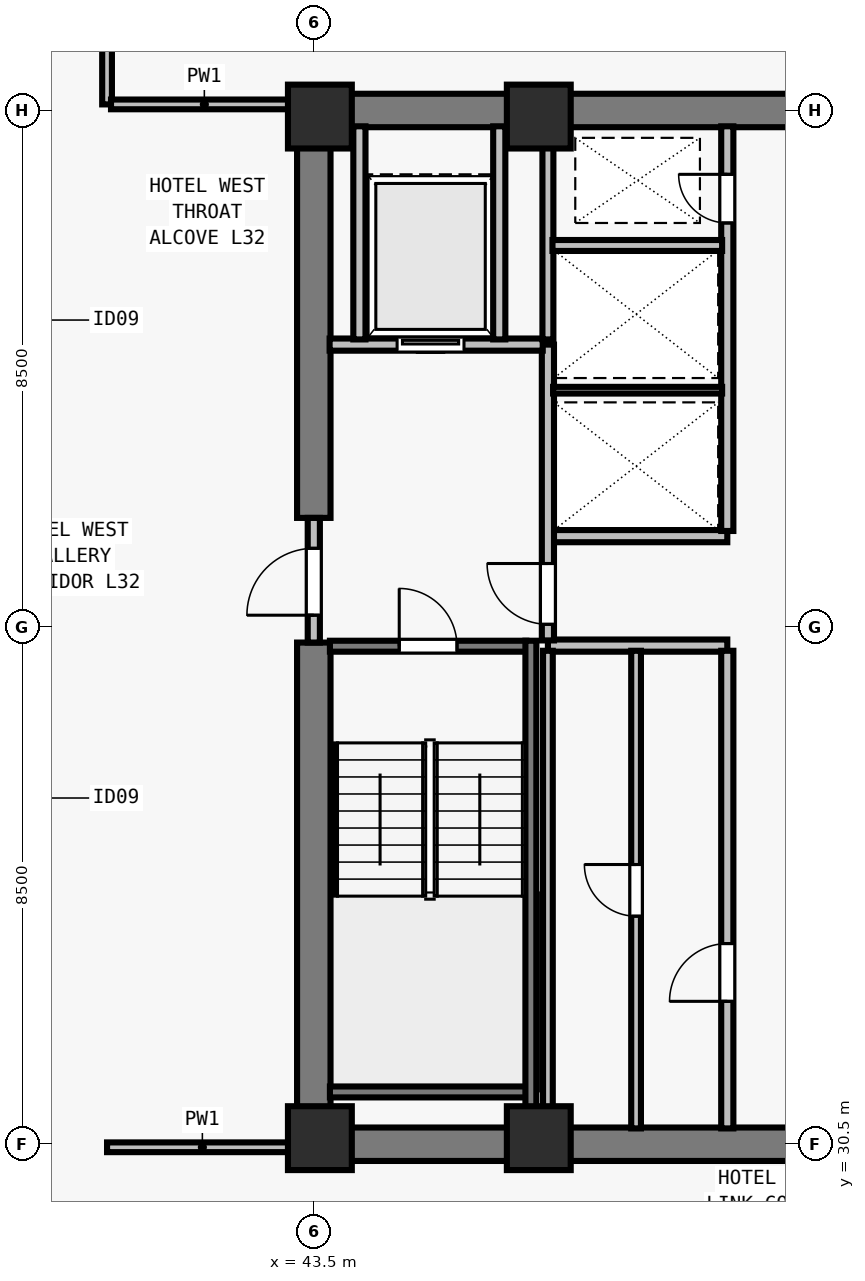
"""IFC4 building model, lengths in metres.
Left out: names, types, materials, properties, quantities, classifications, styles, units other than length and angle.
Written with IfcOpenShell. Run it as: python <this file> out.ifc"""

import sys

from ifc_helpers import new_model, si_unit, direction, frame, frame_2d, origin, origin_2d, place, context, subcontext, project, spatial, rectangle, extrude, element, fill, save


model = new_model("IFC4")
c1 = context("Model", 3, precision=1e-05, world=origin(), true_north=direction((0.0, 1.0)))
c2 = subcontext(c1, "Body", "Model", "MODEL_VIEW")
j1 = project(units=[si_unit("LENGTHUNIT", "METRE"), si_unit("PLANEANGLEUNIT", "RADIAN")], contexts=[c1])
p1 = place(None, origin())
s1 = spatial("IfcSite", under=j1, at=p1, CompositionType="ELEMENT")
p2 = place(p1, origin())
s2 = spatial("IfcBuilding", under=s1, at=p2, CompositionType="ELEMENT")
p3 = place(p2, frame((0.0, 0.0, 120.0)))
s3 = spatial("IfcBuildingStorey", under=s2, at=p3, CompositionType="ELEMENT", Elevation=120.0)
for number, where, z_axis, x_axis in (
    (1, (43.6, 30.6, 0.0), (0.0, 0.0, 1.0), (1.0, 0.0, 0.0)),
    (2, (47.2, 30.6, 0.0), (0.0, 0.0, 1.0), (1.0, 0.0, 0.0)),
    (3, (43.6, 47.4, 0.0), (0.0, 0.0, 1.0), (1.0, 0.0, 0.0)),
    (4, (47.2, 47.4, 0.0), (0.0, 0.0, 1.0), (1.0, 0.0, 0.0)),
):
    element("IfcColumn", number, at=place(p3, frame(where, z_axis=z_axis, x_axis=x_axis)), inside=s3, PredefinedType="COLUMN", context=c2, shape_type="SweptSolid", body=[
        extrude(rectangle(XDim=1.05, YDim=1.05, at=origin_2d()), origin(), (0.0, 0.0, 1.0), 3.5),
    ])
for number, where, z_axis, x_axis in (
    (5, (43.225, 30.5, 0.0), (0.0, 0.0, 1.0), (1.0, 0.0, 0.0)),
    (6, (43.225, 47.5, 0.0), (0.0, 0.0, 1.0), (1.0, 0.0, 0.0)),
):
    element("IfcWall", number, at=place(p3, frame(where, z_axis=z_axis, x_axis=x_axis)), inside=s3, PredefinedType="SHEAR", context=c2, shape_type="SweptSolid", body=[
        extrude(rectangle(XDim=17.55, YDim=0.55, at=frame_2d((8.775, 0.0))), origin(), (0.0, 0.0, 1.0), 3.28),
    ])
p4 = place(p3, frame((43.5, 30.765, 0.0), z_axis=(0.0, 0.0, 1.0), x_axis=(0.0, 1.0, 0.0)))
e7 = element("IfcWall", 7, at=p4, inside=s3, PredefinedType="SHEAR", context=c2, shape_type="SweptSolid", body=[
    extrude(rectangle(XDim=7.985, YDim=0.55, at=frame_2d((3.993, 0.0))), origin(), (0.0, 0.0, 1.0), 3.28),
])
p5 = place(p3, frame((43.5, 40.8, 0.0), z_axis=(0.0, 0.0, 1.0), x_axis=(0.0, 1.0, 0.0)))
e8 = element("IfcWall", 8, at=p5, inside=s3, PredefinedType="SHEAR", context=c2, shape_type="SweptSolid", body=[
    extrude(rectangle(XDim=6.435, YDim=0.55, at=frame_2d((3.218, 0.0))), origin(), (0.0, 0.0, 1.0), 3.28),
])
for number, where, z_axis, x_axis in (
    (9, (47.35, 38.7, 0.0), (0.0, 0.0, 1.0), (1.0, 0.0, 0.0)),
    (10, (47.35, 40.5, 0.0), (0.0, 0.0, 1.0), (1.0, 0.0, 0.0)),
):
    element("IfcWall", number, at=place(p3, frame(where, z_axis=z_axis, x_axis=x_axis)), inside=s3, PredefinedType="SOLIDWALL", context=c2, shape_type="SweptSolid", body=[
        extrude(rectangle(XDim=2.95, YDim=0.2, at=frame_2d((1.475, 0.0))), origin(), (0.0, 0.0, 1.0), 3.28),
    ])
p6 = place(p3, frame((50.3, 30.76, 0.0), z_axis=(0.0, 0.0, 1.0), x_axis=(0.0, 1.0, 0.0)))
e11 = element("IfcWall", 11, at=p6, inside=s3, PredefinedType="SOLIDWALL", context=c2, shape_type="SweptSolid", body=[
    extrude(rectangle(XDim=7.855, YDim=0.2, at=frame_2d((3.927, 0.0))), origin(), (0.0, 0.0, 1.0), 3.28),
])
p7 = place(p6, frame((2.09, 0.0, 0.0)))
e12 = element("IfcOpeningElement", 12, at=p7, cuts=e11, PredefinedType="OPENING", context=c2, shape_type="SweptSolid", body=[
    extrude(rectangle(XDim=0.95, YDim=2.12, at=frame_2d((0.475, 1.06))), frame((0.0, 0.11, 0.0), z_axis=(0.0, -1.0, 0.0), x_axis=(1.0, 0.0, 0.0)), (0.0, 0.0, 1.0), 0.22),
])
p8 = place(p3, frame((50.3, 40.585, 0.0), z_axis=(0.0, 0.0, 1.0), x_axis=(0.0, 1.0, 0.0)))
e13 = element("IfcWall", 13, at=p8, inside=s3, PredefinedType="SOLIDWALL", context=c2, shape_type="SweptSolid", body=[
    extrude(rectangle(XDim=6.655, YDim=0.2, at=frame_2d((3.328, 0.0))), origin(), (0.0, 0.0, 1.0), 3.28),
])
p9 = place(p8, frame((5.065, 0.0, 0.0)))
e14 = element("IfcOpeningElement", 14, at=p9, cuts=e13, PredefinedType="OPENING", context=c2, shape_type="SweptSolid", body=[
    extrude(rectangle(XDim=0.8, YDim=2.08, at=frame_2d((0.4, 1.04))), frame((0.0, 0.11, 0.0), z_axis=(0.0, -1.0, 0.0), x_axis=(1.0, 0.0, 0.0)), (0.0, 0.0, 1.0), 0.22),
])
p10 = place(p3, frame((43.5, 38.75, 0.0), z_axis=(0.0, 0.0, 1.0), x_axis=(0.0, 1.0, 0.0)))
e15 = element("IfcWall", 15, at=p10, inside=s3, PredefinedType="SOLIDWALL", context=c2, shape_type="SweptSolid", body=[
    extrude(rectangle(XDim=2.05, YDim=0.2, at=frame_2d((1.025, 0.0))), origin(), (0.0, 0.0, 1.0), 3.28),
])
p11 = place(p10, frame((0.45, 0.0, 0.0)))
e16 = element("IfcOpeningElement", 16, at=p11, cuts=e15, PredefinedType="OPENING", context=c2, shape_type="SweptSolid", body=[
    extrude(rectangle(XDim=1.1, YDim=2.15, at=frame_2d((0.55, 1.075))), frame((0.0, 0.11, 0.0), z_axis=(0.0, -1.0, 0.0), x_axis=(1.0, 0.0, 0.0)), (0.0, 0.0, 1.0), 0.22),
])
p12 = place(p3, frame((47.35, 38.785, 0.0), z_axis=(0.0, 0.0, 1.0), x_axis=(0.0, 1.0, 0.0)))
e17 = element("IfcWall", 17, at=p12, inside=s3, PredefinedType="SOLIDWALL", context=c2, shape_type="SweptSolid", body=[
    extrude(rectangle(XDim=4.865, YDim=0.2, at=frame_2d((2.433, 0.0))), origin(), (0.0, 0.0, 1.0), 3.28),
])
p13 = place(p12, frame((0.265, 0.0, 0.0)))
e18 = element("IfcOpeningElement", 18, at=p13, cuts=e17, PredefinedType="OPENING", context=c2, shape_type="SweptSolid", body=[
    extrude(rectangle(XDim=1.0, YDim=2.15, at=frame_2d((0.5, 1.075))), frame((0.0, 0.11, 0.0), z_axis=(0.0, -1.0, 0.0), x_axis=(1.0, 0.0, 0.0)), (0.0, 0.0, 1.0), 0.22),
])
p14 = place(p3, frame((43.76, 43.65, 0.0), z_axis=(0.0, 0.0, 1.0), x_axis=(1.0, 0.0, 0.0)))
e19 = element("IfcWall", 19, at=p14, inside=s3, PredefinedType="SOLIDWALL", context=c2, shape_type="SweptSolid", body=[
    extrude(rectangle(XDim=3.505, YDim=0.2, at=frame_2d((1.752, 0.0))), origin(), (0.0, 0.0, 1.0), 3.28),
])
p15 = place(p14, frame((1.11, 0.0, 0.0)))
e20 = element("IfcOpeningElement", 20, at=p15, cuts=e19, PredefinedType="OPENING", context=c2, shape_type="SweptSolid", body=[
    extrude(rectangle(XDim=1.1, YDim=2.2, at=frame_2d((0.55, 1.1))), frame((0.0, 0.11, 0.0), z_axis=(0.0, -1.0, 0.0), x_axis=(1.0, 0.0, 0.0)), (0.0, 0.0, 1.0), 0.22),
])
for number, where, z_axis, x_axis in (
    (21, (46.55, 43.735, 0.0), (0.0, 0.0, 1.0), (0.0, 1.0, 0.0)),
    (22, (44.25, 43.735, 0.0), (0.0, 0.0, 1.0), (0.0, 1.0, 0.0)),
):
    element("IfcWall", number, at=place(p3, frame(where, z_axis=z_axis, x_axis=x_axis)), inside=s3, PredefinedType="SOLIDWALL", context=c2, shape_type="SweptSolid", body=[
        extrude(rectangle(XDim=3.505, YDim=0.2, at=frame_2d((1.752, 0.0))), origin(), (0.0, 0.0, 1.0), 3.28),
    ])
p16 = place(p3, frame((47.35, 30.76, 0.0), z_axis=(0.0, 0.0, 1.0), x_axis=(0.0, 1.0, 0.0)))
e23 = element("IfcWall", 23, at=p16, inside=s3, PredefinedType="PARTITIONING", context=c2, shape_type="SweptSolid", body=[
    extrude(rectangle(XDim=7.855, YDim=0.16, at=frame_2d((3.927, 0.0))), origin(), (0.0, 0.0, 1.0), 3.28),
])
p17 = place(p3, frame((48.8, 30.76, 0.0), z_axis=(0.0, 0.0, 1.0), x_axis=(0.0, 1.0, 0.0)))
e24 = element("IfcWall", 24, at=p17, inside=s3, PredefinedType="PARTITIONING", context=c2, shape_type="SweptSolid", body=[
    extrude(rectangle(XDim=7.855, YDim=0.16, at=frame_2d((3.927, 0.0))), origin(), (0.0, 0.0, 1.0), 3.28),
])
p18 = place(p17, frame((3.49, 0.0, 0.0)))
e25 = element("IfcOpeningElement", 25, at=p18, cuts=e24, PredefinedType="OPENING", context=c2, shape_type="SweptSolid", body=[
    extrude(rectangle(XDim=0.85, YDim=2.12, at=frame_2d((0.425, 1.06))), frame((0.0, 0.09, 0.0), z_axis=(0.0, -1.0, 0.0), x_axis=(1.0, 0.0, 0.0)), (0.0, 0.0, 1.0), 0.18),
])
p19 = place(p3, frame((47.35, 43.735, 0.0), z_axis=(0.0, 0.0, 1.0), x_axis=(0.0, 1.0, 0.0)))
e26 = element("IfcWall", 26, at=p19, inside=s3, PredefinedType="SOLIDWALL", context=c2, shape_type="SweptSolid", body=[
    extrude(rectangle(XDim=3.505, YDim=0.18, at=frame_2d((1.752, 0.0))), origin(), (0.0, 0.0, 1.0), 3.28),
])
p20 = place(p3, frame((47.435, 42.9, 0.0), z_axis=(0.0, 0.0, 1.0), x_axis=(1.0, 0.0, 0.0)))
e27 = element("IfcWall", 27, at=p20, inside=s3, PredefinedType="PARTITIONING", context=c2, shape_type="SweptSolid", body=[
    extrude(rectangle(XDim=2.78, YDim=0.11, at=frame_2d((1.39, 0.0))), origin(), (0.0, 0.0, 1.0), 3.28),
])
p21 = place(p3, frame((47.425, 45.28, 0.0), z_axis=(0.0, 0.0, 1.0), x_axis=(1.0, 0.0, 0.0)))
e28 = element("IfcWall", 28, at=p21, inside=s3, PredefinedType="SOLIDWALL", context=c2, shape_type="SweptSolid", body=[
    extrude(rectangle(XDim=2.79, YDim=0.18, at=frame_2d((1.395, 0.0))), origin(), (0.0, 0.0, 1.0), 3.28),
])
p22 = place(p3, frame((40.1, 47.6, 0.0), z_axis=(0.0, 0.0, 1.0), x_axis=(0.0, 1.0, 0.0)))
e29 = element("IfcWall", 29, at=p22, inside=s3, PredefinedType="PARTITIONING", context=c2, shape_type="SweptSolid", body=[
    extrude(rectangle(XDim=15.075, YDim=0.16, at=frame_2d((7.538, 0.0))), origin(), (0.0, 0.0, 1.0), 2.555),
])
p23 = place(p22, frame((1.8, 0.0, 0.0)))
e30 = element("IfcOpeningElement", 30, at=p23, cuts=e29, PredefinedType="OPENING", context=c2, shape_type="SweptSolid", body=[
    extrude(rectangle(XDim=0.96, YDim=2.12, at=frame_2d((0.48, 1.06))), frame((0.0, 0.09, 0.0), z_axis=(0.0, -1.0, 0.0), x_axis=(1.0, 0.0, 0.0)), (0.0, 0.0, 1.0), 0.18),
])
p24 = place(p3, frame((40.1, 30.45, 0.0), z_axis=(0.0, 0.0, 1.0), x_axis=(1.0, 0.0, 0.0)))
e31 = element("IfcWall", 31, at=p24, inside=s3, PredefinedType="PARTITIONING", context=c2, shape_type="SweptSolid", body=[
    extrude(rectangle(XDim=3.135, YDim=0.16, at=frame_2d((1.567, 0.0))), origin(), (0.0, 0.0, 1.0), 3.28),
])
p25 = place(p3, frame((40.165, 47.6, 0.0), z_axis=(0.0, 0.0, 1.0), x_axis=(1.0, 0.0, 0.0)))
e32 = element("IfcWall", 32, at=p25, inside=s3, PredefinedType="PARTITIONING", context=c2, shape_type="SweptSolid", body=[
    extrude(rectangle(XDim=3.07, YDim=0.16, at=frame_2d((1.535, 0.0))), origin(), (0.0, 0.0, 1.0), 3.28),
])
p26 = place(p3, frame((43.765, 38.69, 0.0), z_axis=(0.0, 0.0, 1.0), x_axis=(1.0, 0.0, 0.0)))
e33 = element("IfcWall", 33, at=p26, inside=s3, PredefinedType="SOLIDWALL", context=c2, shape_type="SweptSolid", body=[
    extrude(rectangle(XDim=3.23, YDim=0.18, at=frame_2d((1.615, 0.0))), origin(), (0.0, 0.0, 1.0), 3.28),
])
p27 = place(p26, frame((1.14, 0.0, 0.0)))
e34 = element("IfcOpeningElement", 34, at=p27, cuts=e33, PredefinedType="OPENING", context=c2, shape_type="SweptSolid", body=[
    extrude(rectangle(XDim=0.95, YDim=2.15, at=frame_2d((0.475, 1.075))), frame((0.0, 0.1, 0.0), z_axis=(0.0, -1.0, 0.0), x_axis=(1.0, 0.0, 0.0)), (0.0, 0.0, 1.0), 0.2),
])
p28 = place(p3, frame((43.765, 31.36, 0.0), z_axis=(0.0, 0.0, 1.0), x_axis=(1.0, 0.0, 0.0)))
e35 = element("IfcWall", 35, at=p28, inside=s3, PredefinedType="SOLIDWALL", context=c2, shape_type="SweptSolid", body=[
    extrude(rectangle(XDim=3.23, YDim=0.18, at=frame_2d((1.615, 0.0))), origin(), (0.0, 0.0, 1.0), 3.28),
])
p29 = place(p3, frame((47.07, 38.78, 0.0), z_axis=(0.0, 0.0, 1.0), x_axis=(0.0, -1.0, 0.0)))
e36 = element("IfcWall", 36, at=p29, inside=s3, PredefinedType="SOLIDWALL", context=c2, shape_type="SweptSolid", body=[
    extrude(rectangle(XDim=8.017, YDim=0.18, at=frame_2d((4.009, 0.0))), origin(), (0.0, 0.0, 1.0), 3.28),
])
p30 = place(p11, origin())
e37 = element("IfcDoor", 37, at=p30, inside=s3, OperationType="SINGLE_SWING_LEFT", PredefinedType="DOOR", context=c2, shape_type="SweptSolid", body=[
    extrude(rectangle(XDim=1.1, YDim=2.15, at=frame_2d((0.55, 1.075))), frame((0.0, 0.025, 0.0), z_axis=(0.0, -1.0, 0.0), x_axis=(1.0, 0.0, 0.0)), (0.0, 0.0, 1.0), 0.05),
])
fill(e16, e37)
p31 = place(p13, origin())
e38 = element("IfcDoor", 38, at=p31, inside=s3, OperationType="SINGLE_SWING_RIGHT", PredefinedType="DOOR", context=c2, shape_type="SweptSolid", body=[
    extrude(rectangle(XDim=1.0, YDim=2.15, at=frame_2d((0.5, 1.075))), frame((0.0, 0.025, 0.0), z_axis=(0.0, -1.0, 0.0), x_axis=(1.0, 0.0, 0.0)), (0.0, 0.0, 1.0), 0.05),
])
fill(e18, e38)
p32 = place(p15, origin())
e39 = element("IfcDoor", 39, at=p32, inside=s3, OperationType="SLIDING_TO_LEFT", PredefinedType="DOOR", context=c2, shape_type="SweptSolid", body=[
    extrude(rectangle(XDim=1.1, YDim=2.2, at=frame_2d((0.55, 1.1))), frame((0.0, 0.025, 0.0), z_axis=(0.0, -1.0, 0.0), x_axis=(1.0, 0.0, 0.0)), (0.0, 0.0, 1.0), 0.05),
])
fill(e20, e39)
p33 = place(p7, origin())
e40 = element("IfcDoor", 40, at=p33, inside=s3, OperationType="SINGLE_SWING_LEFT", PredefinedType="DOOR", context=c2, shape_type="SweptSolid", body=[
    extrude(rectangle(XDim=0.95, YDim=2.12, at=frame_2d((0.475, 1.06))), frame((0.0, 0.025, 0.0), z_axis=(0.0, -1.0, 0.0), x_axis=(1.0, 0.0, 0.0)), (0.0, 0.0, 1.0), 0.05),
])
fill(e12, e40)
p34 = place(p18, origin())
e41 = element("IfcDoor", 41, at=p34, inside=s3, OperationType="SINGLE_SWING_RIGHT", PredefinedType="DOOR", context=c2, shape_type="SweptSolid", body=[
    extrude(rectangle(XDim=0.85, YDim=2.12, at=frame_2d((0.425, 1.06))), frame((0.0, 0.025, 0.0), z_axis=(0.0, -1.0, 0.0), x_axis=(1.0, 0.0, 0.0)), (0.0, 0.0, 1.0), 0.05),
])
fill(e25, e41)
p35 = place(p9, origin())
e42 = element("IfcDoor", 42, at=p35, inside=s3, OperationType="SINGLE_SWING_RIGHT", PredefinedType="DOOR", context=c2, shape_type="SweptSolid", body=[
    extrude(rectangle(XDim=0.8, YDim=2.08, at=frame_2d((0.4, 1.04))), frame((0.0, 0.025, 0.0), z_axis=(0.0, -1.0, 0.0), x_axis=(1.0, 0.0, 0.0)), (0.0, 0.0, 1.0), 0.05),
])
fill(e14, e42)
p36 = place(p27, origin())
e43 = element("IfcDoor", 43, at=p36, inside=s3, OperationType="SINGLE_SWING_LEFT", PredefinedType="DOOR", context=c2, shape_type="SweptSolid", body=[
    extrude(rectangle(XDim=0.95, YDim=2.15, at=frame_2d((0.475, 1.075))), frame((0.0, 0.025, 0.0), z_axis=(0.0, -1.0, 0.0), x_axis=(1.0, 0.0, 0.0)), (0.0, 0.0, 1.0), 0.05),
])
fill(e34, e43)
save(model, sys.argv[1])
